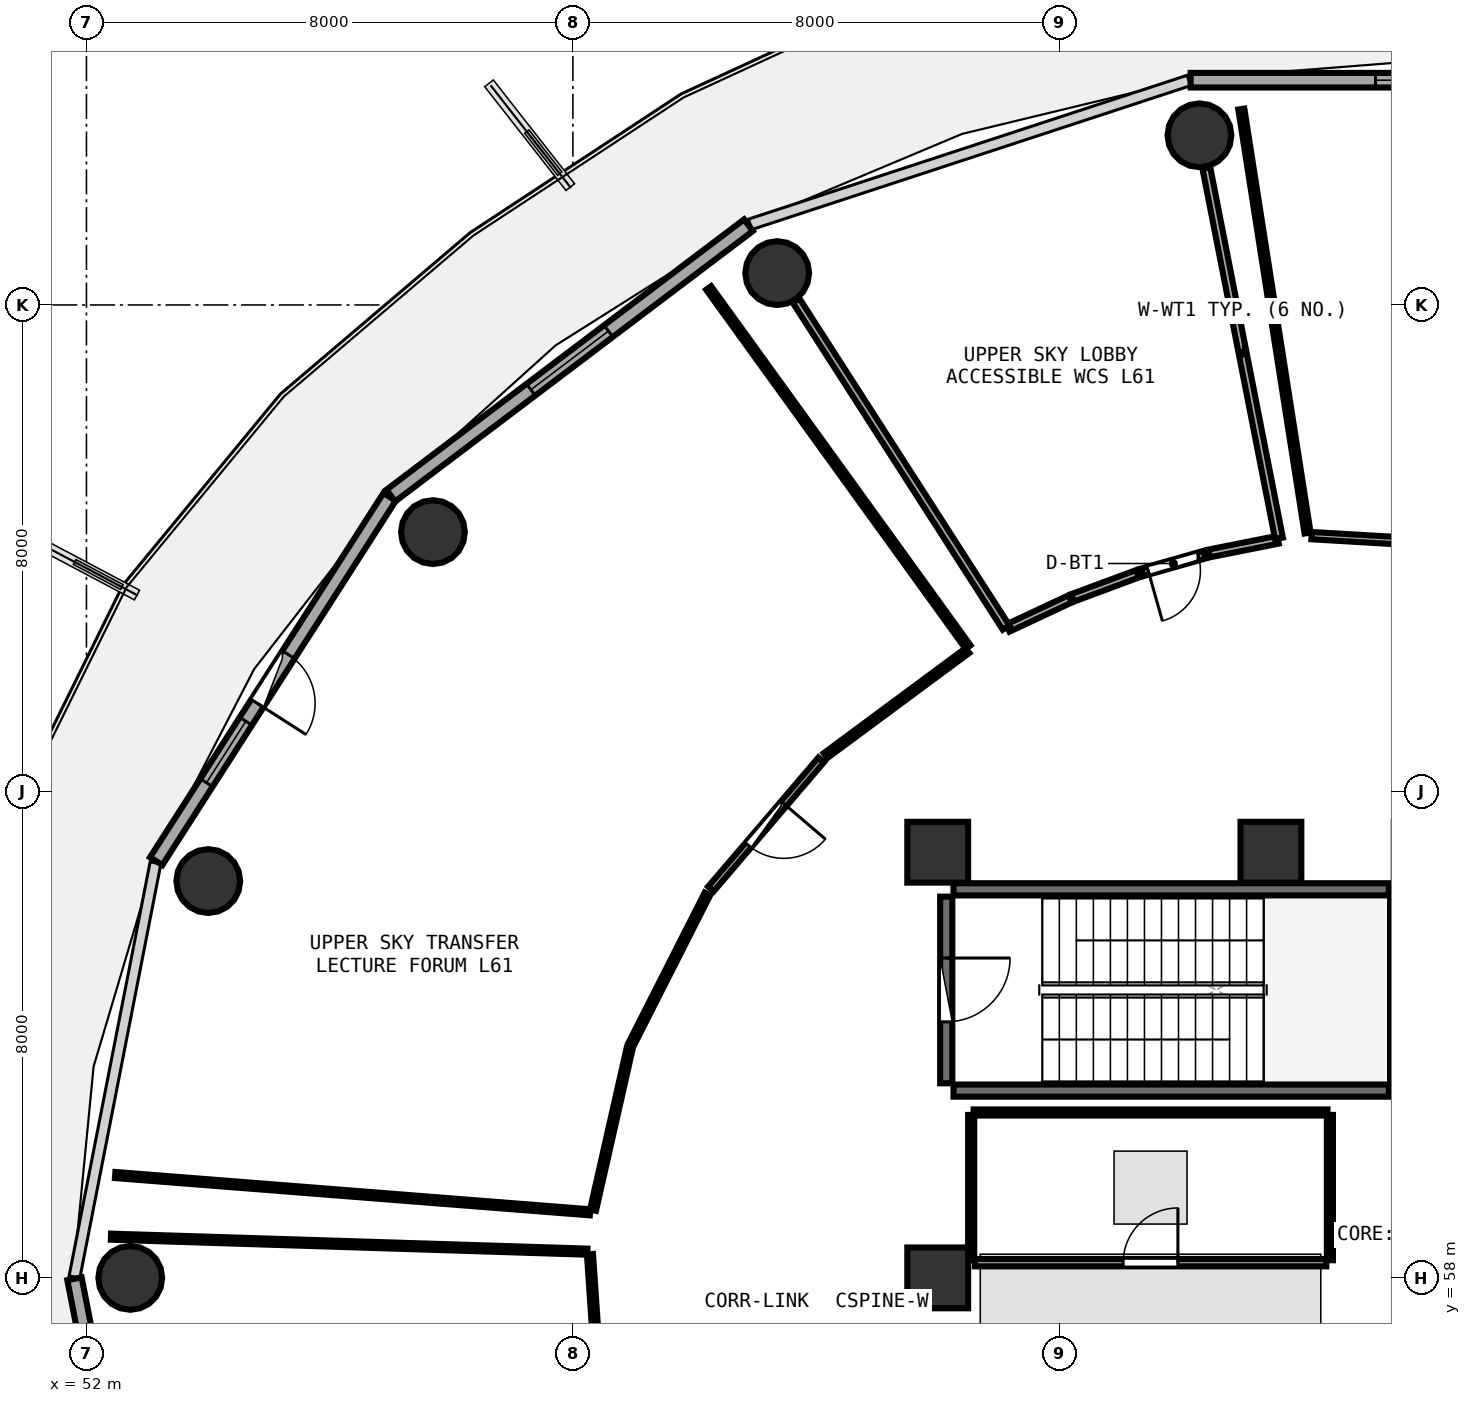
"""IFC4 building model, lengths in metres.
Left out: names, types, materials, properties, quantities, classifications, styles, units other than length and angle.
Written with IfcOpenShell. Run it as: python <this file> out.ifc"""

import sys

from ifc_helpers import new_model, si_unit, direction, frame, frame_2d, origin, origin_2d, place, context, subcontext, project, spatial, rectangle, circle, extrude, element, fill, save


model = new_model("IFC4")
c1 = context("Model", 3, precision=1e-05, world=origin(), true_north=direction((0.0, 1.0)))
c2 = subcontext(c1, "Body", "Model", "MODEL_VIEW")
j1 = project(units=[si_unit("LENGTHUNIT", "METRE"), si_unit("PLANEANGLEUNIT", "RADIAN")], contexts=[c1])
p1 = place(None, origin())
s1 = spatial("IfcSite", under=j1, at=p1, CompositionType="ELEMENT")
p2 = place(p1, origin())
s2 = spatial("IfcBuilding", under=s1, at=p2, CompositionType="ELEMENT")
p3 = place(p2, frame((0.0, 0.0, 238.2)))
s3 = spatial("IfcBuildingStorey", under=s2, at=p3, CompositionType="ELEMENT", Elevation=238.2)
for number, where, z_axis, x_axis in (
    (1, (71.48, 65.0, 0.0), (0.0, 0.0, 1.0), (1.0, 0.0, 0.0)),
    (2, (66.0, 65.0, 0.0), (0.0, 0.0, 1.0), (1.0, 0.0, 0.0)),
    (3, (66.0, 58.0, 0.0), (0.0, 0.0, 1.0), (1.0, 0.0, 0.0)),
):
    element("IfcColumn", number, at=place(p3, frame(where, z_axis=z_axis, x_axis=x_axis)), inside=s3, PredefinedType="PILASTER", context=c2, shape_type="SweptSolid", body=[
        extrude(rectangle(XDim=1.0, YDim=1.0, at=origin_2d()), origin(), (0.0, 0.0, 1.0), 4.76),
    ])
for number, where, z_axis, x_axis in (
    (4, (70.305, 76.79, 0.0), (0.0, 0.0, 1.0), (1.0, 0.0, 0.0)),
    (5, (63.36, 74.524, 0.0), (0.0, 0.0, 1.0), (1.0, 0.0, 0.0)),
    (6, (57.698, 70.264, 0.0), (0.0, 0.0, 1.0), (1.0, 0.0, 0.0)),
    (7, (54.003, 64.526, 0.0), (0.0, 0.0, 1.0), (1.0, 0.0, 0.0)),
    (8, (52.72, 58.0, 0.0), (0.0, 0.0, 1.0), (1.0, 0.0, 0.0)),
):
    element("IfcColumn", number, at=place(p3, frame(where, z_axis=z_axis, x_axis=x_axis)), inside=s3, PredefinedType="COLUMN", context=c2, shape_type="SweptSolid", body=[
        extrude(circle(Radius=0.525, at=origin_2d()), origin(), (0.0, 0.0, 1.0), 4.76),
    ])
p4 = place(p3, frame((77.84, 77.696, 0.0), z_axis=(0.0, 0.0, 1.0), x_axis=(-1.0, 0.0, 0.0)))
e9 = element("IfcWall", 9, at=p4, inside=s3, PredefinedType="SOLIDWALL", context=c2, shape_type="SweptSolid", body=[
    extrude(rectangle(XDim=7.68, YDim=0.24, at=frame_2d((3.84, 0.0))), origin(), (0.0, 0.0, 1.0), 4.345),
])
p5 = place(p4, frame((3.04, 0.0, 0.85)))
e10 = element("IfcOpeningElement", 10, at=p5, cuts=e9, PredefinedType="OPENING", context=c2, shape_type="SweptSolid", body=[
    extrude(rectangle(XDim=1.6, YDim=1.45, at=frame_2d((0.8, 0.725))), frame((0.0, 0.13, 0.0), z_axis=(0.0, -1.0, 0.0), x_axis=(1.0, 0.0, 0.0)), (0.0, 0.0, 1.0), 0.26),
])
p6 = place(p3, frame((62.888, 75.312, 0.0), z_axis=(0.0, 0.0, 1.0), x_axis=(-0.797701674595, -0.603052268338, 0.0)))
e11 = element("IfcWall", 11, at=p6, inside=s3, PredefinedType="SOLIDWALL", context=c2, shape_type="SweptSolid", body=[
    extrude(rectangle(XDim=7.374, YDim=0.24, at=frame_2d((3.687, 0.0))), origin(), (0.0, 0.0, 1.0), 4.345),
])
p7 = place(p6, frame((2.887, 0.0, 0.85)))
e12 = element("IfcOpeningElement", 12, at=p7, cuts=e11, PredefinedType="OPENING", context=c2, shape_type="SweptSolid", body=[
    extrude(rectangle(XDim=1.6, YDim=1.45, at=frame_2d((0.8, 0.725))), frame((0.0, 0.13, 0.0), z_axis=(0.0, -1.0, 0.0), x_axis=(1.0, 0.0, 0.0)), (0.0, 0.0, 1.0), 0.26),
])
p8 = place(p3, frame((56.986, 70.843, 0.0), z_axis=(0.0, 0.0, 1.0), x_axis=(-0.539539512973, -0.841960280501, 0.0)))
e13 = element("IfcWall", 13, at=p8, inside=s3, PredefinedType="SOLIDWALL", context=c2, shape_type="SweptSolid", body=[
    extrude(rectangle(XDim=7.115, YDim=0.24, at=frame_2d((3.557, 0.0))), origin(), (0.0, 0.0, 1.0), 4.345),
])
p9 = place(p8, frame((3.082, 0.0, 0.0)))
e14 = element("IfcOpeningElement", 14, at=p9, cuts=e13, PredefinedType="OPENING", context=c2, shape_type="SweptSolid", body=[
    extrude(rectangle(XDim=0.95, YDim=2.1, at=frame_2d((0.475, 1.05))), frame((0.0, 0.13, 0.0), z_axis=(0.0, -1.0, 0.0), x_axis=(1.0, 0.0, 0.0)), (0.0, 0.0, 1.0), 0.26),
])
p10 = place(p8, frame((4.382, 0.0, 0.85)))
e15 = element("IfcOpeningElement", 15, at=p10, cuts=e13, PredefinedType="OPENING", context=c2, shape_type="SweptSolid", body=[
    extrude(rectangle(XDim=1.2, YDim=1.45, at=frame_2d((0.6, 0.725))), frame((0.0, 0.13, 0.0), z_axis=(0.0, -1.0, 0.0), x_axis=(1.0, 0.0, 0.0)), (0.0, 0.0, 1.0), 0.26),
])
p11 = place(p3, frame((51.803, 57.985, 0.0), z_axis=(0.0, 0.0, 1.0), x_axis=(0.192069055673, -0.981381413036, 0.0)))
e16 = element("IfcWall", 16, at=p11, inside=s3, PredefinedType="SOLIDWALL", context=c2, shape_type="SweptSolid", body=[
    extrude(rectangle(XDim=6.94, YDim=0.24, at=frame_2d((3.47, 0.0))), origin(), (0.0, 0.0, 1.0), 4.345),
])
p12 = place(p11, frame((2.67, 0.0, 0.85)))
e17 = element("IfcOpeningElement", 17, at=p12, cuts=e16, PredefinedType="OPENING", context=c2, shape_type="SweptSolid", body=[
    extrude(rectangle(XDim=1.6, YDim=1.45, at=frame_2d((0.8, 0.725))), frame((0.0, 0.13, 0.0), z_axis=(0.0, -1.0, 0.0), x_axis=(1.0, 0.0, 0.0)), (0.0, 0.0, 1.0), 0.26),
])
p13 = place(p3, frame((66.26, 61.08, 0.0), z_axis=(0.0, 0.0, 1.0), x_axis=(1.0, 0.0, 0.0)))
e18 = element("IfcWall", 18, at=p13, inside=s3, PredefinedType="SHEAR", context=c2, shape_type="SweptSolid", body=[
    extrude(rectangle(XDim=7.16, YDim=0.2, at=frame_2d((3.58, 0.0))), origin(), (0.0, 0.0, 1.0), 4.36),
])
p14 = place(p3, frame((73.54, 61.2, 0.0), z_axis=(0.0, 0.0, 1.0), x_axis=(0.0, 1.0, 0.0)))
e19 = element("IfcWall", 19, at=p14, inside=s3, PredefinedType="SHEAR", context=c2, shape_type="SweptSolid", body=[
    extrude(rectangle(XDim=3.07, YDim=0.2, at=frame_2d((1.535, 0.0))), origin(), (0.0, 0.0, 1.0), 4.36),
])
p15 = place(p3, frame((73.42, 64.39, 0.0), z_axis=(0.0, 0.0, 1.0), x_axis=(-1.0, 0.0, 0.0)))
e20 = element("IfcWall", 20, at=p15, inside=s3, PredefinedType="SHEAR", context=c2, shape_type="SweptSolid", body=[
    extrude(rectangle(XDim=7.16, YDim=0.2, at=frame_2d((3.58, 0.0))), origin(), (0.0, 0.0, 1.0), 4.36),
])
p16 = place(p3, frame((66.14, 64.27, 0.0), z_axis=(0.0, 0.0, 1.0), x_axis=(0.0, -1.0, 0.0)))
e21 = element("IfcWall", 21, at=p16, inside=s3, PredefinedType="SHEAR", context=c2, shape_type="SweptSolid", body=[
    extrude(rectangle(XDim=3.07, YDim=0.2, at=frame_2d((1.535, 0.0))), origin(), (0.0, 0.0, 1.0), 4.36),
])
p17 = place(p16, frame((1.01, 0.0, 0.0)))
e22 = element("IfcOpeningElement", 22, at=p17, cuts=e21, PredefinedType="OPENING", context=c2, shape_type="SweptSolid", body=[
    extrude(rectangle(XDim=1.05, YDim=2.1, at=frame_2d((0.525, 1.05))), frame((0.0, 0.11, 0.0), z_axis=(0.0, -1.0, 0.0), x_axis=(1.0, 0.0, 0.0)), (0.0, 0.0, 1.0), 0.22),
])
p18 = place(p3, frame((66.61, 58.25, 0.0), z_axis=(0.0, 0.0, 1.0), x_axis=(1.0, 0.0, 0.0)))
e23 = element("IfcWall", 23, at=p18, inside=s3, PredefinedType="PARTITIONING", context=c2, shape_type="SweptSolid", body=[
    extrude(rectangle(XDim=5.78, YDim=0.12, at=frame_2d((2.89, 0.0))), origin(), (0.0, 0.0, 1.0), 4.35),
])
p19 = place(p18, frame((2.44, 0.0, 0.0)))
e24 = element("IfcOpeningElement", 24, at=p19, cuts=e23, PredefinedType="OPENING", context=c2, shape_type="SweptSolid", body=[
    extrude(rectangle(XDim=0.9, YDim=2.08, at=frame_2d((0.45, 1.04))), frame((0.0, 0.07, 0.0), z_axis=(0.0, -1.0, 0.0), x_axis=(1.0, 0.0, 0.0)), (0.0, 0.0, 1.0), 0.14),
])
p20 = place(p3, frame((77.609, 69.885, 0.0), z_axis=(0.0, 0.0, 1.0), x_axis=(-0.998275911992, 0.058695856216, 0.0)))
e25 = element("IfcWall", 25, at=p20, inside=s3, PredefinedType="PARTITIONING", context=c2, shape_type="SweptSolid", body=[
    extrude(rectangle(XDim=5.47, YDim=0.12, at=frame_2d((2.735, 0.0))), origin(), (0.0, 0.0, 1.0), 2.345),
])
p21 = place(p20, frame((2.285, 0.0, 0.0)))
e26 = element("IfcOpeningElement", 26, at=p21, cuts=e25, PredefinedType="OPENING", context=c2, shape_type="SweptSolid", body=[
    extrude(rectangle(XDim=0.9, YDim=2.08, at=frame_2d((0.45, 1.04))), frame((0.0, 0.07, 0.0), z_axis=(0.0, -1.0, 0.0), x_axis=(1.0, 0.0, 0.0)), (0.0, 0.0, 1.0), 0.14),
])
p22 = place(p3, frame((70.388, 69.894, 0.0), z_axis=(0.0, 0.0, 1.0), x_axis=(-0.962014611548, -0.27299796184, 0.0)))
e27 = element("IfcWall", 27, at=p22, inside=s3, PredefinedType="PLUMBINGWALL", context=c2, shape_type="SweptSolid", body=[
    extrude(rectangle(XDim=1.067, YDim=0.13, at=frame_2d((0.533, 0.0))), origin(), (0.0, 0.0, 1.0), 4.35),
])
p23 = place(p22, frame((0.104, 0.0, 0.0)))
e28 = element("IfcOpeningElement", 28, at=p23, cuts=e27, PredefinedType="OPENING", context=c2, shape_type="SweptSolid", body=[
    extrude(rectangle(XDim=0.86, YDim=2.05, at=frame_2d((0.43, 1.025))), frame((0.0, 0.075, 0.0), z_axis=(0.0, -1.0, 0.0), x_axis=(1.0, 0.0, 0.0)), (0.0, 0.0, 1.0), 0.15),
])
p24 = place(p3, frame((64.084, 66.519, 0.0), z_axis=(0.0, 0.0, 1.0), x_axis=(-0.649465845108, -0.760390765356, 0.0)))
e29 = element("IfcWall", 29, at=p24, inside=s3, PredefinedType="PARTITIONING", context=c2, shape_type="SweptSolid", body=[
    extrude(rectangle(XDim=2.793, YDim=0.12, at=frame_2d((1.396, 0.0))), origin(), (0.0, 0.0, 1.0), 2.345),
])
p25 = place(p24, frame((0.947, 0.0, 0.0)))
e30 = element("IfcOpeningElement", 30, at=p25, cuts=e29, PredefinedType="OPENING", context=c2, shape_type="SweptSolid", body=[
    extrude(rectangle(XDim=0.9, YDim=2.08, at=frame_2d((0.45, 1.04))), frame((0.0, 0.07, 0.0), z_axis=(0.0, -1.0, 0.0), x_axis=(1.0, 0.0, 0.0)), (0.0, 0.0, 1.0), 0.14),
])
p26 = place(p3, frame((72.45, 58.29, 0.0), z_axis=(0.0, 0.0, 1.0), x_axis=(0.0, 1.0, 0.0)))
e31 = element("IfcWall", 31, at=p26, inside=s3, PredefinedType="PARTITIONING", context=c2, shape_type="SweptSolid", body=[
    extrude(rectangle(XDim=2.39, YDim=0.1, at=frame_2d((1.195, 0.0))), origin(), (0.0, 0.0, 1.0), 4.35),
])
p27 = place(p3, frame((72.41, 60.72, 0.0), z_axis=(0.0, 0.0, 1.0), x_axis=(-1.0, 0.0, 0.0)))
e32 = element("IfcWall", 32, at=p27, inside=s3, PredefinedType="PARTITIONING", context=c2, shape_type="SweptSolid", body=[
    extrude(rectangle(XDim=5.82, YDim=0.1, at=frame_2d((2.91, 0.0))), origin(), (0.0, 0.0, 1.0), 4.35),
])
p28 = place(p3, frame((66.55, 60.68, 0.0), z_axis=(0.0, 0.0, 1.0), x_axis=(0.0, -1.0, 0.0)))
e33 = element("IfcWall", 33, at=p28, inside=s3, PredefinedType="PARTITIONING", context=c2, shape_type="SweptSolid", body=[
    extrude(rectangle(XDim=2.39, YDim=0.1, at=frame_2d((1.195, 0.0))), origin(), (0.0, 0.0, 1.0), 4.35),
])
p29 = place(p3, frame((72.083, 70.25, 0.0), z_axis=(0.0, 0.0, 1.0), x_axis=(-0.154409597951, 0.988006921059, 0.0)))
e34 = element("IfcWall", 34, at=p29, inside=s3, PredefinedType="PARTITIONING", context=c2, shape_type="SweptSolid", body=[
    extrude(rectangle(XDim=7.057, YDim=0.1, at=frame_2d((3.528, 0.0))), origin(), (0.0, 0.0, 1.0), 2.345),
])
p30 = place(p3, frame((71.596, 70.139, 0.0), z_axis=(0.0, 0.0, 1.0), x_axis=(-0.980718868188, -0.195423902275, 0.0)))
e35 = element("IfcWall", 35, at=p30, inside=s3, PredefinedType="PLUMBINGWALL", context=c2, shape_type="SweptSolid", body=[
    extrude(rectangle(XDim=1.153, YDim=0.13, at=frame_2d((0.577, 0.0))), origin(), (0.0, 0.0, 1.0), 2.345),
])
p31 = place(p3, frame((69.285, 69.579, 0.0), z_axis=(0.0, 0.0, 1.0), x_axis=(-0.937441235011, -0.348143549273, 0.0)))
e36 = element("IfcWall", 36, at=p31, inside=s3, PredefinedType="PLUMBINGWALL", context=c2, shape_type="SweptSolid", body=[
    extrude(rectangle(XDim=1.141, YDim=0.13, at=frame_2d((0.57, 0.0))), origin(), (0.0, 0.0, 1.0), 4.35),
])
p32 = place(p3, frame((68.179, 69.167, 0.0), z_axis=(0.0, 0.0, 1.0), x_axis=(-0.905764172402, -0.423782094941, 0.0)))
e37 = element("IfcWall", 37, at=p32, inside=s3, PredefinedType="PLUMBINGWALL", context=c2, shape_type="SweptSolid", body=[
    extrude(rectangle(XDim=1.133, YDim=0.13, at=frame_2d((0.566, 0.0))), origin(), (0.0, 0.0, 1.0), 4.35),
])
p33 = place(p3, frame((67.124, 68.695, 0.0), z_axis=(0.0, 0.0, 1.0), x_axis=(-0.540404110524, 0.841405608092, 0.0)))
e38 = element("IfcWall", 38, at=p33, inside=s3, PredefinedType="PLUMBINGWALL", context=c2, shape_type="SweptSolid", body=[
    extrude(rectangle(XDim=6.389, YDim=0.13, at=frame_2d((3.194, 0.0))), origin(), (0.0, 0.0, 1.0), 2.345),
])
p34 = place(p3, frame((70.418, 76.252, 0.0), z_axis=(0.0, 0.0, 1.0), x_axis=(0.192430061255, -0.98131069062, 0.0)))
e39 = element("IfcWall", 39, at=p34, inside=s3, PredefinedType="PLUMBINGWALL", context=c2, shape_type="SweptSolid", body=[
    extrude(rectangle(XDim=6.205, YDim=0.13, at=frame_2d((3.103, 0.0))), origin(), (0.0, 0.0, 1.0), 2.345),
])
p35 = place(p3, frame((66.49, 68.317, 0.0), z_axis=(0.0, 0.0, 1.0), x_axis=(-0.803775990189, -0.594932061328, 0.0)))
e40 = element("IfcWall", 40, at=p35, inside=s3, PredefinedType="PARTITIONING", context=c2, shape_type="SweptSolid", body=[
    extrude(rectangle(XDim=2.905, YDim=0.1, at=frame_2d((1.453, 0.0))), origin(), (0.0, 0.0, 1.0), 2.345),
])
p36 = place(p3, frame((62.213, 64.314, 0.0), z_axis=(0.0, 0.0, 1.0), x_axis=(-0.452532690557, -0.891747814114, 0.0)))
e41 = element("IfcWall", 41, at=p36, inside=s3, PredefinedType="PARTITIONING", context=c2, shape_type="SweptSolid", body=[
    extrude(rectangle(XDim=2.768, YDim=0.1, at=frame_2d((1.384, 0.0))), origin(), (0.0, 0.0, 1.0), 2.345),
])
p37 = place(p3, frame((60.933, 61.771, 0.0), z_axis=(0.0, 0.0, 1.0), x_axis=(-0.221074940913, -0.975256822842, 0.0)))
e42 = element("IfcWall", 42, at=p37, inside=s3, PredefinedType="PARTITIONING", context=c2, shape_type="SweptSolid", body=[
    extrude(rectangle(XDim=2.724, YDim=0.1, at=frame_2d((1.362, 0.0))), origin(), (0.0, 0.0, 1.0), 4.35),
])
p38 = place(p3, frame((60.282, 59.078, 0.0), z_axis=(0.0, 0.0, 1.0), x_axis=(-0.996926267176, 0.078345502835, 0.0)))
e43 = element("IfcWall", 43, at=p38, inside=s3, PredefinedType="PARTITIONING", context=c2, shape_type="SweptSolid", body=[
    extrude(rectangle(XDim=7.834, YDim=0.1, at=frame_2d((3.917, 0.0))), origin(), (0.0, 0.0, 1.0), 2.345),
])
p39 = place(p3, frame((62.232, 74.28, 0.0), z_axis=(0.0, 0.0, 1.0), x_axis=(0.585534597139, -0.810647417533, 0.0)))
e44 = element("IfcWall", 44, at=p39, inside=s3, PredefinedType="PARTITIONING", context=c2, shape_type="SweptSolid", body=[
    extrude(rectangle(XDim=7.286, YDim=0.1, at=frame_2d((3.643, 0.0))), origin(), (0.0, 0.0, 1.0), 2.345),
])
p40 = place(p3, frame((60.281, 58.39, 0.0), z_axis=(0.0, 0.0, 1.0), x_axis=(0.068072237744, -0.99768039494, 0.0)))
e45 = element("IfcWall", 45, at=p40, inside=s3, PredefinedType="PARTITIONING", context=c2, shape_type="SweptSolid", body=[
    extrude(rectangle(XDim=2.285, YDim=0.1, at=frame_2d((1.142, 0.0))), origin(), (0.0, 0.0, 1.0), 2.345),
])
p41 = place(p3, frame((52.403, 58.678, 0.0), z_axis=(0.0, 0.0, 1.0), x_axis=(0.999506102382, -0.03142532897, 0.0)))
e46 = element("IfcWall", 46, at=p41, inside=s3, PredefinedType="PARTITIONING", context=c2, shape_type="SweptSolid", body=[
    extrude(rectangle(XDim=7.839, YDim=0.1, at=frame_2d((3.919, 0.0))), origin(), (0.0, 0.0, 1.0), 2.345),
])
p42 = place(p5, origin())
e47 = element("IfcWindow", 47, at=p42, inside=s3, PartitioningType="SINGLE_PANEL", PredefinedType="WINDOW", context=c2, shape_type="SweptSolid", body=[
    extrude(rectangle(XDim=1.6, YDim=1.45, at=frame_2d((0.8, 0.725))), frame((0.0, 0.03, 0.0), z_axis=(0.0, -1.0, 0.0), x_axis=(1.0, 0.0, 0.0)), (0.0, 0.0, 1.0), 0.06),
])
fill(e10, e47)
p43 = place(p7, origin())
e48 = element("IfcWindow", 48, at=p43, inside=s3, PartitioningType="SINGLE_PANEL", PredefinedType="WINDOW", context=c2, shape_type="SweptSolid", body=[
    extrude(rectangle(XDim=1.6, YDim=1.45, at=frame_2d((0.8, 0.725))), frame((0.0, 0.03, 0.0), z_axis=(0.0, -1.0, 0.0), x_axis=(1.0, 0.0, 0.0)), (0.0, 0.0, 1.0), 0.06),
])
fill(e12, e48)
p44 = place(p9, frame((0.95, 0.0, 0.0), z_axis=(0.0, 0.0, 1.0), x_axis=(-1.0, 0.0, 0.0)))
e49 = element("IfcDoor", 49, at=p44, inside=s3, OperationType="SINGLE_SWING_LEFT", PredefinedType="DOOR", context=c2, shape_type="SweptSolid", body=[
    extrude(rectangle(XDim=0.95, YDim=2.1, at=frame_2d((0.475, 1.05))), frame((0.0, 0.025, 0.0), z_axis=(0.0, -1.0, 0.0), x_axis=(1.0, 0.0, 0.0)), (0.0, 0.0, 1.0), 0.05),
])
fill(e14, e49)
p45 = place(p10, origin())
e50 = element("IfcWindow", 50, at=p45, inside=s3, PartitioningType="SINGLE_PANEL", PredefinedType="WINDOW", context=c2, shape_type="SweptSolid", body=[
    extrude(rectangle(XDim=1.2, YDim=1.45, at=frame_2d((0.6, 0.725))), frame((0.0, 0.03, 0.0), z_axis=(0.0, -1.0, 0.0), x_axis=(1.0, 0.0, 0.0)), (0.0, 0.0, 1.0), 0.06),
])
fill(e15, e50)
p46 = place(p17, origin())
e51 = element("IfcDoor", 51, at=p46, inside=s3, OperationType="SINGLE_SWING_LEFT", PredefinedType="DOOR", context=c2, shape_type="SweptSolid", body=[
    extrude(rectangle(XDim=1.05, YDim=2.1, at=frame_2d((0.525, 1.05))), frame((0.0, 0.025, 0.0), z_axis=(0.0, -1.0, 0.0), x_axis=(1.0, 0.0, 0.0)), (0.0, 0.0, 1.0), 0.05),
])
fill(e22, e51)
p47 = place(p19, origin())
e52 = element("IfcDoor", 52, at=p47, inside=s3, OperationType="SINGLE_SWING_RIGHT", PredefinedType="DOOR", context=c2, shape_type="SweptSolid", body=[
    extrude(rectangle(XDim=0.9, YDim=2.08, at=frame_2d((0.45, 1.04))), frame((0.0, 0.025, 0.0), z_axis=(0.0, -1.0, 0.0), x_axis=(1.0, 0.0, 0.0)), (0.0, 0.0, 1.0), 0.05),
])
fill(e24, e52)
p48 = place(p23, origin())
e53 = element("IfcDoor", 53, at=p48, inside=s3, OperationType="SINGLE_SWING_RIGHT", PredefinedType="DOOR", context=c2, shape_type="SweptSolid", body=[
    extrude(rectangle(XDim=0.86, YDim=2.05, at=frame_2d((0.43, 1.025))), frame((0.0, 0.025, 0.0), z_axis=(0.0, -1.0, 0.0), x_axis=(1.0, 0.0, 0.0)), (0.0, 0.0, 1.0), 0.05),
])
fill(e28, e53)
p49 = place(p25, origin())
e54 = element("IfcDoor", 54, at=p49, inside=s3, OperationType="SINGLE_SWING_LEFT", PredefinedType="DOOR", context=c2, shape_type="SweptSolid", body=[
    extrude(rectangle(XDim=0.9, YDim=2.08, at=frame_2d((0.45, 1.04))), frame((0.0, 0.025, 0.0), z_axis=(0.0, -1.0, 0.0), x_axis=(1.0, 0.0, 0.0)), (0.0, 0.0, 1.0), 0.05),
])
fill(e30, e54)
save(model, sys.argv[1])
